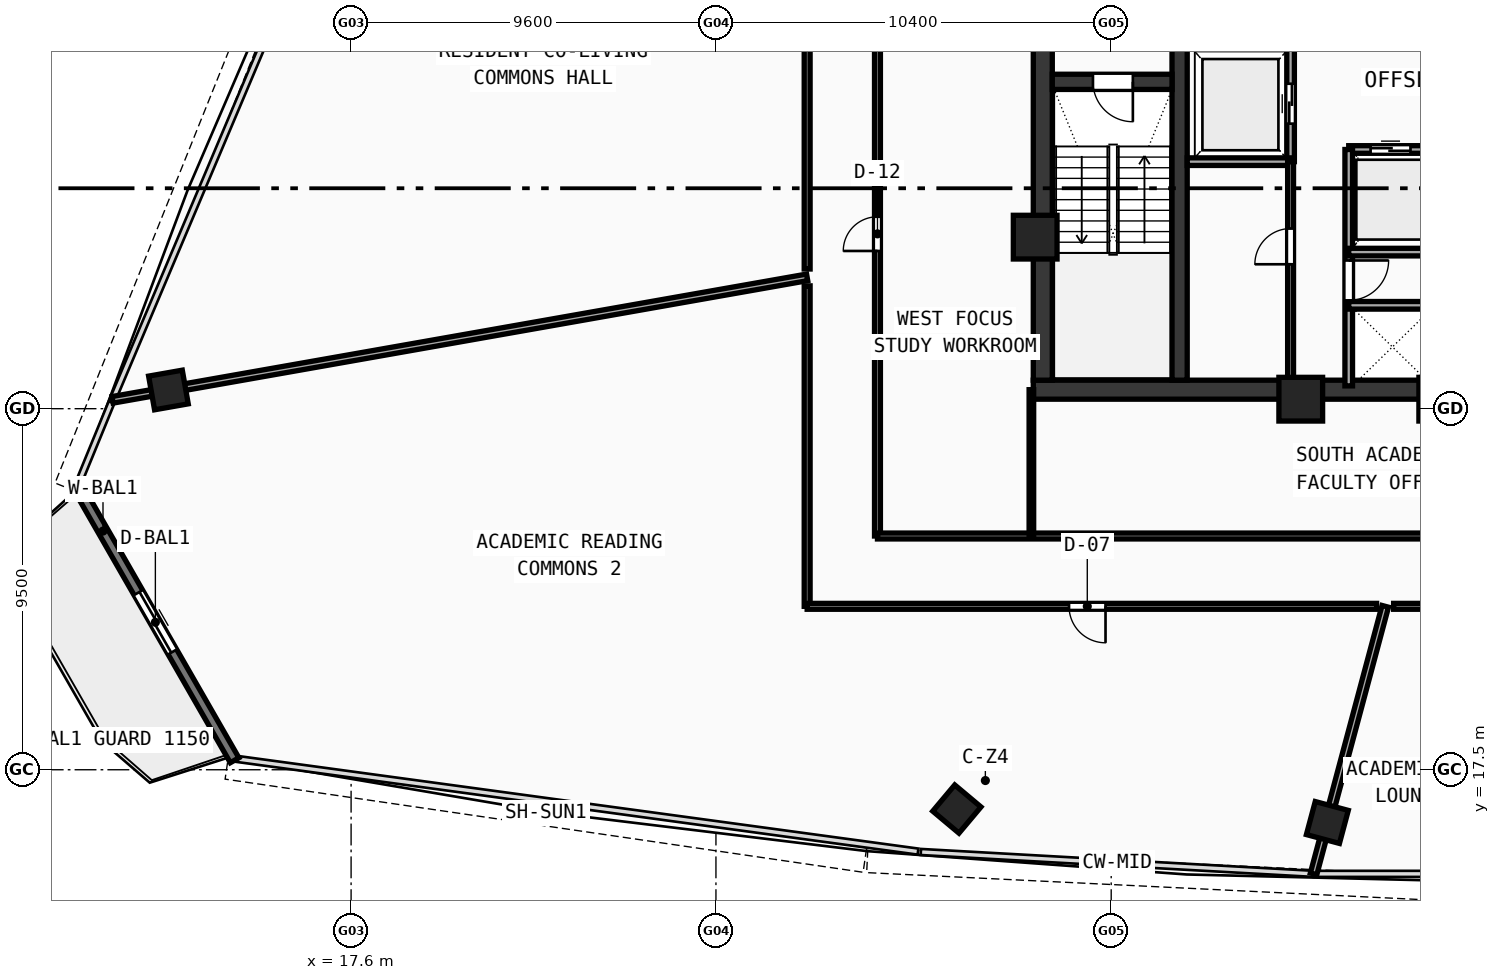
"""IFC4 building model, lengths in metres.
Left out: names, types, materials, properties, quantities, classifications, styles, units other than length and angle.
Written with IfcOpenShell. Run it as: python <this file> out.ifc"""

import sys

from ifc_helpers import new_model, si_unit, direction, frame, frame_2d, origin, origin_with_axes, origin_2d, place, context, subcontext, project, spatial, rectangle, hollow_rectangle, extrude, source, transform, mapped, element, fill, save


model = new_model("IFC4")
c1 = context("Model", 3, precision=1e-05, world=origin(), true_north=direction((0.0, 1.0)))
c2 = subcontext(c1, "Body", "Model", "MODEL_VIEW")
j1 = project(units=[si_unit("LENGTHUNIT", "METRE"), si_unit("PLANEANGLEUNIT", "RADIAN")], contexts=[c1])
p1 = place(None, origin())
s1 = spatial("IfcSite", under=j1, at=p1, CompositionType="ELEMENT")
p2 = place(p1, origin())
s2 = spatial("IfcBuilding", under=s1, at=p2, CompositionType="ELEMENT")
p3 = place(p2, frame((0.0, 0.0, 211.36)))
s3 = spatial("IfcBuildingStorey", under=s2, at=p3, CompositionType="ELEMENT", Elevation=211.36)
p4 = place(p3, frame((35.55, 27.5, 0.0), z_axis=(0.0, 0.0, 1.0), x_axis=(1.0, 0.0, 0.0)))
e1 = element("IfcWall", 1, at=p4, inside=s3, PredefinedType="SHEAR", context=c2, shape_type="SweptSolid", body=[
    extrude(rectangle(XDim=24.9, YDim=0.5, at=frame_2d((12.45, 0.0))), origin(), (0.0, 0.0, 1.0), 3.54),
])
p5 = place(p3, frame((35.8, 27.75, 0.0), z_axis=(0.0, 0.0, 1.0), x_axis=(0.0, 1.0, 0.0)))
e2 = element("IfcWall", 2, at=p5, inside=s3, PredefinedType="SHEAR", context=c2, shape_type="SweptSolid", body=[
    extrude(rectangle(XDim=12.2, YDim=0.5, at=frame_2d((6.1, 0.0))), origin(), (0.0, 0.0, 1.0), 3.54),
])
p6 = place(p3, frame((39.4, 27.75, 0.0), z_axis=(0.0, 0.0, 1.0), x_axis=(0.0, 1.0, 0.0)))
e3 = element("IfcWall", 3, at=p6, inside=s3, PredefinedType="SHEAR", context=c2, shape_type="SweptSolid", body=[
    extrude(rectangle(XDim=12.2, YDim=0.4, at=frame_2d((6.1, 0.0))), origin(), (0.0, 0.0, 1.0), 3.54),
])
p7 = place(p6, frame((10.0, 0.0, 0.0)))
e4 = element("IfcOpeningElement", 4, at=p7, cuts=e3, PredefinedType="OPENING", context=c2, shape_type="SweptSolid", body=[
    extrude(rectangle(XDim=1.1, YDim=2.1, at=frame_2d((0.55, 1.05))), frame((0.0, 0.21, 0.0), z_axis=(0.0, -1.0, 0.0), x_axis=(1.0, 0.0, 0.0)), (0.0, 0.0, 1.0), 0.42),
])
p8 = place(p3, frame((36.05, 35.6, 0.0), z_axis=(0.0, 0.0, 1.0), x_axis=(1.0, 0.0, 0.0)))
e5 = element("IfcWall", 5, at=p8, inside=s3, PredefinedType="SHEAR", context=c2, shape_type="SweptSolid", body=[
    extrude(rectangle(XDim=3.15, YDim=0.4, at=frame_2d((1.575, 0.0))), origin(), (0.0, 0.0, 1.0), 3.54),
])
p9 = place(p8, frame((1.07, 0.0, 0.0)))
e6 = element("IfcOpeningElement", 6, at=p9, cuts=e5, PredefinedType="OPENING", context=c2, shape_type="SweptSolid", body=[
    extrude(rectangle(XDim=1.05, YDim=2.1, at=frame_2d((0.525, 1.05))), frame((0.0, 0.21, 0.0), z_axis=(0.0, -1.0, 0.0), x_axis=(1.0, 0.0, 0.0)), (0.0, 0.0, 1.0), 0.42),
])
m1 = source(origin(), c2, "Body", "SweptSolid", [
    extrude(hollow_rectangle(XDim=1.15, YDim=1.15, WallThickness=0.048, at=origin_2d()), origin(), (0.0, 0.0, 1.0), 3.8),
])
for number, where, z_axis, x_axis in (
    (7, (42.588, 27.25, -0.26), (0.0, 0.0, 1.0), (1.0, 0.0, 0.0)),
    (8, (46.272, 27.25, -0.26), (0.0, 0.0, 1.0), (1.0, 0.0, 0.0)),
    (9, (35.6, 31.513, -0.26), (0.0, 0.0, 1.0), (1.0, 0.0, 0.0)),
):
    element("IfcColumn", number, at=place(p3, frame(where, z_axis=z_axis, x_axis=x_axis)), inside=s3, PredefinedType="COLUMN", context=c2, shape_type="MappedRepresentation", body=[
        mapped(m1, transform((0.0, 0.0, 0.0), scale=1.0)),
    ])
m2 = source(origin(), c2, "Body", "SweptSolid", [
    extrude(hollow_rectangle(XDim=0.9, YDim=0.9, WallThickness=0.036, at=origin_2d()), origin(), (0.0, 0.0, 1.0), 3.8),
])
for number, where, z_axis, x_axis in (
    (10, (33.539, 16.466, -0.26), (0.0, 0.0, 1.0), (0.766, -0.643, 0.0)),
    (11, (43.288, 16.112, -0.26), (0.0, 0.0, 1.0), (0.966, -0.259, 0.0)),
    (12, (12.793, 27.492, -0.26), (0.0, 0.0, 1.0), (0.174, -0.985, 0.0)),
):
    element("IfcColumn", number, at=place(p3, frame(where, z_axis=z_axis, x_axis=x_axis)), inside=s3, PredefinedType="COLUMN", context=c2, shape_type="MappedRepresentation", body=[
        mapped(m2, transform((0.0, 0.0, 0.0), scale=1.0)),
    ])
p10 = place(p3, frame((10.365, 25.01, 0.0), z_axis=(0.0, 0.0, 1.0), x_axis=(0.497934125263, -0.867214856249, 0.0)))
e13 = element("IfcWall", 13, at=p10, inside=s3, PredefinedType="STANDARD", context=c2, shape_type="SweptSolid", body=[
    extrude(rectangle(XDim=8.373, YDim=0.26, at=frame_2d((4.186, 0.0))), origin(), (0.0, 0.0, 1.0), 3.54),
])
p11 = place(p10, frame((3.286, 0.0, 0.0)))
e14 = element("IfcOpeningElement", 14, at=p11, cuts=e13, PredefinedType="OPENING", context=c2, shape_type="SweptSolid", body=[
    extrude(rectangle(XDim=1.8, YDim=2.15, at=frame_2d((0.9, 1.075))), frame((0.0, 0.14, 0.0), z_axis=(0.0, -1.0, 0.0), x_axis=(1.0, 0.0, 0.0)), (0.0, 0.0, 1.0), 0.28),
])
p12 = place(p3, frame((42.32, 33.5, 0.0), z_axis=(0.0, 0.0, 1.0), x_axis=(0.0, 1.0, 0.0)))
e15 = element("IfcWall", 15, at=p12, inside=s3, PredefinedType="SOLIDWALL", context=c2, shape_type="SweptSolid", body=[
    extrude(rectangle(XDim=6.45, YDim=0.2, at=frame_2d((3.225, 0.0))), origin(), (0.0, 0.0, 1.0), 3.54),
])
p13 = place(p12, frame((1.0, 0.0, 0.0)))
e16 = element("IfcOpeningElement", 16, at=p13, cuts=e15, PredefinedType="OPENING", context=c2, shape_type="SweptSolid", body=[
    extrude(rectangle(XDim=1.05, YDim=2.1, at=frame_2d((0.525, 1.05))), frame((0.0, 0.11, 0.0), z_axis=(0.0, -1.0, 0.0), x_axis=(1.0, 0.0, 0.0)), (0.0, 0.0, 1.0), 0.22),
])
p14 = place(p3, frame((39.6, 33.5, 0.0), z_axis=(0.0, 0.0, 1.0), x_axis=(1.0, 0.0, 0.0)))
e17 = element("IfcWall", 17, at=p14, inside=s3, PredefinedType="SOLIDWALL", context=c2, shape_type="SweptSolid", body=[
    extrude(rectangle(XDim=2.72, YDim=0.2, at=frame_2d((1.36, 0.0))), origin(), (0.0, 0.0, 1.0), 3.54),
])
p15 = place(p3, frame((43.85, 33.82, 0.0), z_axis=(0.0, 0.0, 1.0), x_axis=(1.0, 0.0, 0.0)))
e18 = element("IfcWall", 18, at=p15, inside=s3, PredefinedType="SOLIDWALL", context=c2, shape_type="SweptSolid", body=[
    extrude(rectangle(XDim=9.83, YDim=0.2, at=frame_2d((4.915, 0.0))), origin(), (0.0, 0.0, 1.0), 3.54),
])
p16 = place(p15, frame((0.575, 0.0, 0.0)))
e19 = element("IfcOpeningElement", 19, at=p16, cuts=e18, PredefinedType="OPENING", context=c2, shape_type="SweptSolid", body=[
    extrude(rectangle(XDim=1.05, YDim=2.1, at=frame_2d((0.525, 1.05))), frame((0.0, 0.11, 0.0), z_axis=(0.0, -1.0, 0.0), x_axis=(1.0, 0.0, 0.0)), (0.0, 0.0, 1.0), 0.22),
])
p17 = place(p15, frame((2.875, 0.0, 0.0)))
e20 = element("IfcOpeningElement", 20, at=p17, cuts=e18, PredefinedType="OPENING", context=c2, shape_type="SweptSolid", body=[
    extrude(rectangle(XDim=1.05, YDim=2.1, at=frame_2d((0.525, 1.05))), frame((0.0, 0.11, 0.0), z_axis=(0.0, -1.0, 0.0), x_axis=(1.0, 0.0, 0.0)), (0.0, 0.0, 1.0), 0.22),
])
p18 = place(p15, frame((5.175, 0.0, 0.0)))
e21 = element("IfcOpeningElement", 21, at=p18, cuts=e18, PredefinedType="OPENING", context=c2, shape_type="SweptSolid", body=[
    extrude(rectangle(XDim=1.05, YDim=2.1, at=frame_2d((0.525, 1.05))), frame((0.0, 0.11, 0.0), z_axis=(0.0, -1.0, 0.0), x_axis=(1.0, 0.0, 0.0)), (0.0, 0.0, 1.0), 0.22),
])
p19 = place(p15, frame((7.475, 0.0, 0.0)))
e22 = element("IfcOpeningElement", 22, at=p19, cuts=e18, PredefinedType="OPENING", context=c2, shape_type="SweptSolid", body=[
    extrude(rectangle(XDim=1.05, YDim=2.1, at=frame_2d((0.525, 1.05))), frame((0.0, 0.11, 0.0), z_axis=(0.0, -1.0, 0.0), x_axis=(1.0, 0.0, 0.0)), (0.0, 0.0, 1.0), 0.22),
])
p20 = place(p3, frame((43.85, 27.6, 0.0), z_axis=(0.0, 0.0, 1.0), x_axis=(0.0, 1.0, 0.0)))
e23 = element("IfcWall", 23, at=p20, inside=s3, PredefinedType="SOLIDWALL", context=c2, shape_type="SweptSolid", body=[
    extrude(rectangle(XDim=6.22, YDim=0.2, at=frame_2d((3.11, 0.0))), origin(), (0.0, 0.0, 1.0), 3.54),
])
p21 = place(p20, frame((2.25, 0.0, 0.0)))
e24 = element("IfcOpeningElement", 24, at=p21, cuts=e23, PredefinedType="OPENING", context=c2, shape_type="SweptSolid", body=[
    extrude(rectangle(XDim=1.05, YDim=2.1, at=frame_2d((0.525, 1.05))), frame((0.0, 0.11, 0.0), z_axis=(0.0, -1.0, 0.0), x_axis=(1.0, 0.0, 0.0)), (0.0, 0.0, 1.0), 0.22),
])
p22 = place(p3, frame((43.85, 29.72, 0.0), z_axis=(0.0, 0.0, 1.0), x_axis=(1.0, 0.0, 0.0)))
e25 = element("IfcWall", 25, at=p22, inside=s3, PredefinedType="SOLIDWALL", context=c2, shape_type="SweptSolid", body=[
    extrude(rectangle(XDim=7.2, YDim=0.2, at=frame_2d((3.6, 0.0))), origin(), (0.0, 0.0, 1.0), 3.54),
])
p23 = place(p3, frame((43.85, 31.12, 0.0), z_axis=(0.0, 0.0, 1.0), x_axis=(1.0, 0.0, 0.0)))
e26 = element("IfcWall", 26, at=p23, inside=s3, PredefinedType="SOLIDWALL", context=c2, shape_type="SweptSolid", body=[
    extrude(rectangle(XDim=9.83, YDim=0.2, at=frame_2d((4.915, 0.0))), origin(), (0.0, 0.0, 1.0), 3.54),
])
p24 = place(p3, frame((42.32, 27.6, 0.0), z_axis=(0.0, 0.0, 1.0), x_axis=(0.0, 1.0, 0.0)))
e27 = element("IfcWall", 27, at=p24, inside=s3, PredefinedType="PARTITIONING", context=c2, shape_type="SweptSolid", body=[
    extrude(rectangle(XDim=5.9, YDim=0.155, at=frame_2d((2.95, 0.0))), origin(), (0.0, 0.0, 1.0), 3.54),
])
p25 = place(p24, frame((3.2, 0.0, 0.0)))
e28 = element("IfcOpeningElement", 28, at=p25, cuts=e27, PredefinedType="OPENING", context=c2, shape_type="SweptSolid", body=[
    extrude(rectangle(XDim=0.94, YDim=2.1, at=frame_2d((0.47, 1.05))), frame((0.0, 0.087, 0.0), z_axis=(0.0, -1.0, 0.0), x_axis=(1.0, 0.0, 0.0)), (0.0, 0.0, 1.0), 0.175),
])
p26 = place(p3, frame((31.45, 23.65, 0.0), z_axis=(0.0, 0.0, 1.0), x_axis=(0.0, 1.0, 0.0)))
e29 = element("IfcWall", 29, at=p26, inside=s3, PredefinedType="PARTITIONING", context=c2, shape_type="SweptSolid", body=[
    extrude(rectangle(XDim=16.6, YDim=0.155, at=frame_2d((8.3, 0.0))), origin(), (0.0, 0.0, 1.0), 2.89),
])
p27 = place(p26, frame((7.5, 0.0, 0.0)))
e30 = element("IfcOpeningElement", 30, at=p27, cuts=e29, PredefinedType="OPENING", context=c2, shape_type="SweptSolid", body=[
    extrude(rectangle(XDim=0.9, YDim=2.08, at=frame_2d((0.45, 1.04))), frame((0.0, 0.087, 0.0), z_axis=(0.0, -1.0, 0.0), x_axis=(1.0, 0.0, 0.0)), (0.0, 0.0, 1.0), 0.175),
])
p28 = place(p3, frame((31.45, 23.65, 0.0), z_axis=(0.0, 0.0, 1.0), x_axis=(1.0, 0.0, 0.0)))
e31 = element("IfcWall", 31, at=p28, inside=s3, PredefinedType="PARTITIONING", context=c2, shape_type="SweptSolid", body=[
    extrude(rectangle(XDim=33.1, YDim=0.155, at=frame_2d((16.55, 0.0))), origin(), (0.0, 0.0, 1.0), 2.89),
])
p29 = place(p28, frame((16.0, 0.0, 0.0)))
e32 = element("IfcOpeningElement", 32, at=p29, cuts=e31, PredefinedType="OPENING", context=c2, shape_type="SweptSolid", body=[
    extrude(rectangle(XDim=0.92, YDim=2.1, at=frame_2d((0.46, 1.05))), frame((0.0, 0.087, 0.0), z_axis=(0.0, -1.0, 0.0), x_axis=(1.0, 0.0, 0.0)), (0.0, 0.0, 1.0), 0.175),
])
p30 = place(p3, frame((35.5, 23.65, 0.0), z_axis=(0.0, 0.0, 1.0), x_axis=(0.0, 1.0, 0.0)))
e33 = element("IfcWall", 33, at=p30, inside=s3, PredefinedType="PARTITIONING", context=c2, shape_type="SweptSolid", body=[
    extrude(rectangle(XDim=3.85, YDim=0.12, at=frame_2d((1.925, 0.0))), origin(), (0.0, 0.0, 1.0), 3.14),
])
p31 = place(p3, frame((29.6, 30.456, 0.0), z_axis=(0.0, 0.0, 1.0), x_axis=(-0.984808051039, -0.173646487465, 0.0)))
e34 = element("IfcWall", 34, at=p31, inside=s3, PredefinedType="PARTITIONING", context=c2, shape_type="SweptSolid", body=[
    extrude(rectangle(XDim=18.557, YDim=0.175, at=frame_2d((9.279, 0.0))), origin(), (0.0, 0.0, 1.0), 2.89),
])
p32 = place(p3, frame((44.811, 21.8, 0.0), z_axis=(0.0, 0.0, 1.0), x_axis=(-0.258817575638, -0.96592622003, 0.0)))
e35 = element("IfcWall", 35, at=p32, inside=s3, PredefinedType="PARTITIONING", context=c2, shape_type="SweptSolid", body=[
    extrude(rectangle(XDim=7.288, YDim=0.175, at=frame_2d((3.644, 0.0))), origin(), (0.0, 0.0, 1.0), 2.89),
])
p33 = place(p3, frame((29.6, 21.8, 0.0), z_axis=(0.0, 0.0, 1.0), x_axis=(0.0, 1.0, 0.0)))
e36 = element("IfcWall", 36, at=p33, inside=s3, PredefinedType="PARTITIONING", context=c2, shape_type="SweptSolid", body=[
    extrude(rectangle(XDim=8.432, YDim=0.155, at=frame_2d((4.216, 0.0))), origin(), (0.0, 0.0, 1.0), 3.14),
])
p34 = place(p3, frame((29.6, 30.675, 0.0), z_axis=(0.0, 0.0, 1.0), x_axis=(0.0, 1.0, 0.0)))
e37 = element("IfcWall", 37, at=p34, inside=s3, PredefinedType="PARTITIONING", context=c2, shape_type="SweptSolid", body=[
    extrude(rectangle(XDim=19.372, YDim=0.155, at=frame_2d((9.686, 0.0))), origin(), (0.0, 0.0, 1.0), 2.89),
])
p35 = place(p34, frame((9.211, 0.0, 0.0)))
e38 = element("IfcOpeningElement", 38, at=p35, cuts=e37, PredefinedType="OPENING", context=c2, shape_type="SweptSolid", body=[
    extrude(rectangle(XDim=0.96, YDim=2.12, at=frame_2d((0.48, 1.06))), frame((0.0, 0.087, 0.0), z_axis=(0.0, -1.0, 0.0), x_axis=(1.0, 0.0, 0.0)), (0.0, 0.0, 1.0), 0.175),
])
p36 = place(p3, frame((47.78, 21.8, 0.0), z_axis=(0.0, 0.0, 1.0), x_axis=(-1.0, 0.0, 0.0)))
e39 = element("IfcWall", 39, at=p36, inside=s3, PredefinedType="PARTITIONING", context=c2, shape_type="SweptSolid", body=[
    extrude(rectangle(XDim=2.749, YDim=0.155, at=frame_2d((1.375, 0.0))), origin(), (0.0, 0.0, 1.0), 3.54),
])
p37 = place(p36, frame((0.914, 0.0, 0.0)))
e40 = element("IfcOpeningElement", 40, at=p37, cuts=e39, PredefinedType="OPENING", context=c2, shape_type="SweptSolid", body=[
    extrude(rectangle(XDim=0.9, YDim=2.08, at=frame_2d((0.45, 1.04))), frame((0.0, 0.087, 0.0), z_axis=(0.0, -1.0, 0.0), x_axis=(1.0, 0.0, 0.0)), (0.0, 0.0, 1.0), 0.175),
])
p38 = place(p3, frame((44.583, 21.8, 0.0), z_axis=(0.0, 0.0, 1.0), x_axis=(-1.0, 0.0, 0.0)))
e41 = element("IfcWall", 41, at=p38, inside=s3, PredefinedType="PARTITIONING", context=c2, shape_type="SweptSolid", body=[
    extrude(rectangle(XDim=14.983, YDim=0.155, at=frame_2d((7.492, 0.0))), origin(), (0.0, 0.0, 1.0), 2.89),
])
p39 = place(p38, frame((7.133, 0.0, 0.0)))
e42 = element("IfcOpeningElement", 42, at=p39, cuts=e41, PredefinedType="OPENING", context=c2, shape_type="SweptSolid", body=[
    extrude(rectangle(XDim=0.96, YDim=2.12, at=frame_2d((0.48, 1.06))), frame((0.0, 0.087, 0.0), z_axis=(0.0, -1.0, 0.0), x_axis=(1.0, 0.0, 0.0)), (0.0, 0.0, 1.0), 0.175),
])
m3 = source(origin(), c2, "Body", "SweptSolid", [
    extrude(rectangle(XDim=1.8, YDim=2.15, at=frame_2d((0.9, 1.075))), frame((0.0, 0.025, 0.0), z_axis=(0.0, -1.0, 0.0), x_axis=(1.0, 0.0, 0.0)), (0.0, 0.0, 1.0), 0.05),
])
p40 = place(p11, origin_with_axes())
e43 = element("IfcDoor", 43, at=p40, inside=s3, OperationType="DOUBLE_DOOR_SLIDING", PredefinedType="DOOR", context=c2, shape_type="MappedRepresentation", body=[
    mapped(m3, transform((0.0, 0.0, 0.0), scale=1.0)),
])
fill(e14, e43)
m4 = source(origin(), c2, "Body", "SweptSolid", [
    extrude(rectangle(XDim=1.05, YDim=2.1, at=frame_2d((0.525, 1.05))), frame((0.0, 0.025, 0.0), z_axis=(0.0, -1.0, 0.0), x_axis=(1.0, 0.0, 0.0)), (0.0, 0.0, 1.0), 0.05),
])
p41 = place(p9, frame((1.05, 0.0, 0.0), z_axis=(0.0, 0.0, 1.0), x_axis=(-1.0, 0.0, 0.0)))
e44 = element("IfcDoor", 44, at=p41, inside=s3, OperationType="SINGLE_SWING_LEFT", PredefinedType="DOOR", context=c2, shape_type="MappedRepresentation", body=[
    mapped(m4, transform((0.0, 0.0, 0.0), scale=1.0)),
])
fill(e6, e44)
p42 = place(p13, origin_with_axes())
e45 = element("IfcDoor", 45, at=p42, inside=s3, OperationType="DOUBLE_DOOR_SLIDING", PredefinedType="DOOR", context=c2, shape_type="MappedRepresentation", body=[
    mapped(m4, transform((0.0, 0.0, 0.0), scale=1.0)),
])
fill(e16, e45)
p43 = place(p16, origin_with_axes())
e46 = element("IfcDoor", 46, at=p43, inside=s3, OperationType="DOUBLE_DOOR_SLIDING", PredefinedType="DOOR", context=c2, shape_type="MappedRepresentation", body=[
    mapped(m4, transform((0.0, 0.0, 0.0), scale=1.0)),
])
fill(e19, e46)
p44 = place(p21, frame((1.05, 0.0, 0.0), z_axis=(0.0, 0.0, 1.0), x_axis=(-1.0, 0.0, 0.0)))
e47 = element("IfcDoor", 47, at=p44, inside=s3, OperationType="SINGLE_SWING_LEFT", PredefinedType="DOOR", context=c2, shape_type="MappedRepresentation", body=[
    mapped(m4, transform((0.0, 0.0, 0.0), scale=1.0)),
])
fill(e24, e47)
m5 = source(origin(), c2, "Body", "SweptSolid", [
    extrude(rectangle(XDim=0.94, YDim=2.1, at=frame_2d((0.47, 1.05))), frame((0.0, 0.025, 0.0), z_axis=(0.0, -1.0, 0.0), x_axis=(1.0, 0.0, 0.0)), (0.0, 0.0, 1.0), 0.05),
])
p45 = place(p25, origin_with_axes())
e48 = element("IfcDoor", 48, at=p45, inside=s3, OperationType="SINGLE_SWING_LEFT", PredefinedType="DOOR", context=c2, shape_type="MappedRepresentation", body=[
    mapped(m5, transform((0.0, 0.0, 0.0), scale=1.0)),
])
fill(e28, e48)
m6 = source(origin(), c2, "Body", "SweptSolid", [
    extrude(rectangle(XDim=0.9, YDim=2.08, at=frame_2d((0.45, 1.04))), frame((0.0, 0.025, 0.0), z_axis=(0.0, -1.0, 0.0), x_axis=(1.0, 0.0, 0.0)), (0.0, 0.0, 1.0), 0.05),
])
p46 = place(p27, origin_with_axes())
e49 = element("IfcDoor", 49, at=p46, inside=s3, OperationType="SINGLE_SWING_LEFT", PredefinedType="DOOR", context=c2, shape_type="MappedRepresentation", body=[
    mapped(m6, transform((0.0, 0.0, 0.0), scale=1.0)),
])
fill(e30, e49)
m7 = source(origin(), c2, "Body", "SweptSolid", [
    extrude(rectangle(XDim=0.96, YDim=2.12, at=frame_2d((0.48, 1.06))), frame((0.0, 0.025, 0.0), z_axis=(0.0, -1.0, 0.0), x_axis=(1.0, 0.0, 0.0)), (0.0, 0.0, 1.0), 0.05),
])
p47 = place(p39, origin_with_axes())
e50 = element("IfcDoor", 50, at=p47, inside=s3, OperationType="SINGLE_SWING_LEFT", PredefinedType="DOOR", context=c2, shape_type="MappedRepresentation", body=[
    mapped(m7, transform((0.0, 0.0, 0.0), scale=1.0)),
])
fill(e42, e50)
save(model, sys.argv[1])
